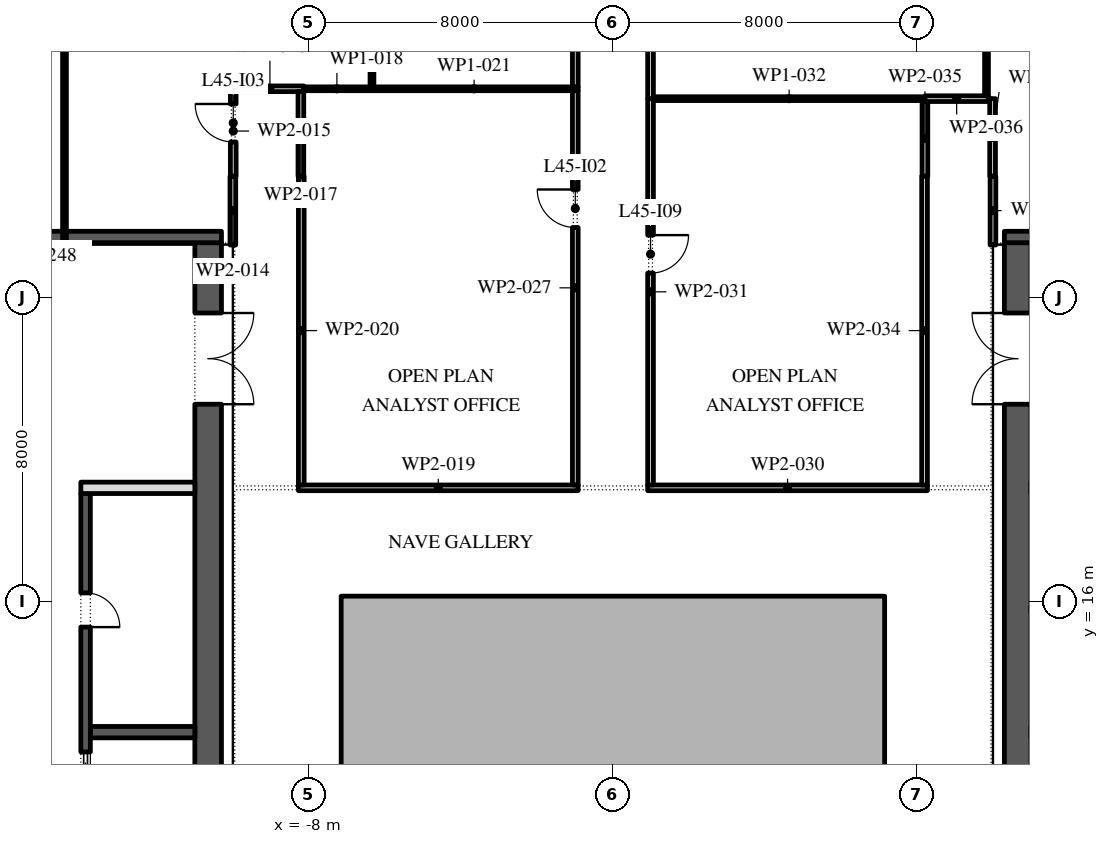
"""IFC4 building model, lengths in metres.
Left out: names, types, materials, properties, quantities, classifications, styles, units other than length and angle.
Written with IfcOpenShell. Run it as: python <this file> out.ifc"""

import sys

from ifc_helpers import new_model, si_unit, direction, frame, frame_2d, origin, place, context, subcontext, project, spatial, polyline, rectangle, outline, extrude, element, fill, save


model = new_model("IFC4")
c1 = context("Model", 3, precision=1e-05, world=origin(), true_north=direction((0.0, 1.0)))
c2 = subcontext(c1, "Body", "Model", "MODEL_VIEW")
j1 = project(units=[si_unit("LENGTHUNIT", "METRE"), si_unit("PLANEANGLEUNIT", "RADIAN")], contexts=[c1])
p1 = place(None, origin())
s1 = spatial("IfcSite", under=j1, at=p1, CompositionType="ELEMENT")
p2 = place(p1, origin())
s2 = spatial("IfcBuilding", under=s1, at=p2, CompositionType="ELEMENT")
p3 = place(p2, frame((0.0, 0.0, 205.2)))
s3 = spatial("IfcBuildingStorey", under=s2, at=p3, CompositionType="ELEMENT", Elevation=205.2)
p4 = place(p3, origin())
e1 = element("IfcWall", 1, at=p4, inside=s3, PredefinedType="STANDARD", context=c2, shape_type="SweptSolid", body=[
    extrude(outline(polyline([(-7.15, -2.15), (7.15, -2.15), (7.15, 16.15), (-7.15, 16.15), (-7.15, -2.15)]), holes=[polyline([(-7.0, -2.0), (-7.0, 16.0), (7.0, 16.0), (7.0, -2.0), (-7.0, -2.0)])]), origin(), (0.0, 0.0, 1.0), 4.0),
])
p5 = place(p3, frame((-10.65, -2.45, 0.0), z_axis=(0.0, 0.0, 1.0), x_axis=(0.0, 1.0, 0.0)))
e2 = element("IfcWall", 2, at=p5, inside=s3, PredefinedType="SHEAR", context=c2, shape_type="SweptSolid", body=[
    extrude(rectangle(XDim=27.9, YDim=0.7, at=frame_2d((13.95, 0.0))), origin(), (0.0, 0.0, 1.0), 4.0),
])
p6 = place(p5, frame((23.65, 0.0, 0.0)))
e3 = element("IfcOpeningElement", 3, at=p6, cuts=e2, PredefinedType="OPENING", context=c2, shape_type="SweptSolid", body=[
    extrude(rectangle(XDim=2.4, YDim=2.1, at=frame_2d((1.2, 1.05))), frame((0.0, 0.36, 0.0), z_axis=(0.0, -1.0, 0.0), x_axis=(1.0, 0.0, 0.0)), (0.0, 0.0, 1.0), 0.72),
])
p7 = place(p5, frame((1.087, 0.0, 0.0)))
e4 = element("IfcOpeningElement", 4, at=p7, cuts=e2, PredefinedType="OPENING", context=c2, shape_type="SweptSolid", body=[
    extrude(rectangle(XDim=0.9, YDim=2.1, at=frame_2d((0.45, 1.05))), frame((0.0, 0.36, 0.0), z_axis=(0.0, -1.0, 0.0), x_axis=(1.0, 0.0, 0.0)), (0.0, 0.0, 1.0), 0.72),
])
p8 = place(p5, frame((4.262, 0.0, 0.0)))
e5 = element("IfcOpeningElement", 5, at=p8, cuts=e2, PredefinedType="OPENING", context=c2, shape_type="SweptSolid", body=[
    extrude(rectangle(XDim=1.0, YDim=2.1, at=frame_2d((0.5, 1.05))), frame((0.0, 0.36, 0.0), z_axis=(0.0, -1.0, 0.0), x_axis=(1.0, 0.0, 0.0)), (0.0, 0.0, 1.0), 0.72),
])
p9 = place(p3, frame((-21.7, 25.6, 0.0), z_axis=(0.0, 0.0, 1.0), x_axis=(1.0, 0.0, 0.0)))
e6 = element("IfcWall", 6, at=p9, inside=s3, PredefinedType="SHEAR", context=c2, shape_type="SweptSolid", body=[
    extrude(rectangle(XDim=11.4, YDim=0.3, at=frame_2d((5.7, 0.0))), origin(), (0.0, 0.0, 1.0), 4.0),
])
p10 = place(p3, frame((-13.75, 12.571, 0.0), z_axis=(0.0, 0.0, 1.0), x_axis=(1.0, 0.0, 0.0)))
e7 = element("IfcWall", 7, at=p10, inside=s3, PredefinedType="SHEAR", context=c2, shape_type="SweptSolid", body=[
    extrude(rectangle(XDim=2.75, YDim=0.3, at=frame_2d((1.375, 0.0))), origin(), (0.0, 0.0, 1.0), 4.0),
])
p11 = place(p3, frame((-13.875, -2.45, 0.0), z_axis=(0.0, 0.0, 1.0), x_axis=(0.0, 1.0, 0.0)))
e8 = element("IfcWall", 8, at=p11, inside=s3, PredefinedType="SHEAR", context=c2, shape_type="SweptSolid", body=[
    extrude(rectangle(XDim=21.3, YDim=0.25, at=frame_2d((10.65, 0.0))), origin(), (0.0, 0.0, 1.0), 4.0),
])
p12 = place(p11, frame((17.786, 0.0, 0.0)))
e9 = element("IfcOpeningElement", 9, at=p12, cuts=e8, PredefinedType="OPENING", context=c2, shape_type="SweptSolid", body=[
    extrude(rectangle(XDim=0.9, YDim=2.1, at=frame_2d((0.45, 1.05))), frame((0.0, 0.135, 0.0), z_axis=(0.0, -1.0, 0.0), x_axis=(1.0, 0.0, 0.0)), (0.0, 0.0, 1.0), 0.27),
])
p13 = place(p11, frame((6.971, 0.0, 0.0)))
e10 = element("IfcOpeningElement", 10, at=p13, cuts=e8, PredefinedType="OPENING", context=c2, shape_type="SweptSolid", body=[
    extrude(rectangle(XDim=1.1, YDim=2.1, at=frame_2d((0.55, 1.05))), frame((0.0, 0.135, 0.0), z_axis=(0.0, -1.0, 0.0), x_axis=(1.0, 0.0, 0.0)), (0.0, 0.0, 1.0), 0.27),
])
p14 = place(p11, frame((9.114, 0.0, 0.0)))
e11 = element("IfcOpeningElement", 11, at=p14, cuts=e8, PredefinedType="OPENING", context=c2, shape_type="SweptSolid", body=[
    extrude(rectangle(XDim=1.1, YDim=2.1, at=frame_2d((0.55, 1.05))), frame((0.0, 0.135, 0.0), z_axis=(0.0, -1.0, 0.0), x_axis=(1.0, 0.0, 0.0)), (0.0, 0.0, 1.0), 0.27),
])
p15 = place(p11, frame((11.257, 0.0, 0.0)))
e12 = element("IfcOpeningElement", 12, at=p15, cuts=e8, PredefinedType="OPENING", context=c2, shape_type="SweptSolid", body=[
    extrude(rectangle(XDim=1.1, YDim=2.1, at=frame_2d((0.55, 1.05))), frame((0.0, 0.135, 0.0), z_axis=(0.0, -1.0, 0.0), x_axis=(1.0, 0.0, 0.0)), (0.0, 0.0, 1.0), 0.27),
])
p16 = place(p11, frame((13.4, 0.0, 0.0)))
e13 = element("IfcOpeningElement", 13, at=p16, cuts=e8, PredefinedType="OPENING", context=c2, shape_type="SweptSolid", body=[
    extrude(rectangle(XDim=1.1, YDim=2.1, at=frame_2d((0.55, 1.05))), frame((0.0, 0.135, 0.0), z_axis=(0.0, -1.0, 0.0), x_axis=(1.0, 0.0, 0.0)), (0.0, 0.0, 1.0), 0.27),
])
p17 = place(p3, frame((-14.0, 19.0, 0.0), z_axis=(0.0, 0.0, 1.0), x_axis=(1.0, 0.0, 0.0)))
e14 = element("IfcWall", 14, at=p17, inside=s3, PredefinedType="PARTITIONING", context=c2, shape_type="SweptSolid", body=[
    extrude(rectangle(XDim=3.0, YDim=0.3, at=frame_2d((1.5, 0.0))), origin(), (0.0, 0.0, 1.0), 4.0),
])
p18 = place(p3, frame((10.65, -2.45, 0.0), z_axis=(0.0, 0.0, 1.0), x_axis=(0.0, 1.0, 0.0)))
e15 = element("IfcWall", 15, at=p18, inside=s3, PredefinedType="SHEAR", context=c2, shape_type="SweptSolid", body=[
    extrude(rectangle(XDim=27.9, YDim=0.7, at=frame_2d((13.95, 0.0))), origin(), (0.0, 0.0, 1.0), 4.0),
])
p19 = place(p18, frame((23.65, 0.0, 0.0)))
e16 = element("IfcOpeningElement", 16, at=p19, cuts=e15, PredefinedType="OPENING", context=c2, shape_type="SweptSolid", body=[
    extrude(rectangle(XDim=2.4, YDim=2.1, at=frame_2d((1.2, 1.05))), frame((0.0, 0.36, 0.0), z_axis=(0.0, -1.0, 0.0), x_axis=(1.0, 0.0, 0.0)), (0.0, 0.0, 1.0), 0.72),
])
p20 = place(p18, frame((1.087, 0.0, 0.0)))
e17 = element("IfcOpeningElement", 17, at=p20, cuts=e15, PredefinedType="OPENING", context=c2, shape_type="SweptSolid", body=[
    extrude(rectangle(XDim=0.9, YDim=2.1, at=frame_2d((0.45, 1.05))), frame((0.0, 0.36, 0.0), z_axis=(0.0, -1.0, 0.0), x_axis=(1.0, 0.0, 0.0)), (0.0, 0.0, 1.0), 0.72),
])
p21 = place(p18, frame((4.262, 0.0, 0.0)))
e18 = element("IfcOpeningElement", 18, at=p21, cuts=e15, PredefinedType="OPENING", context=c2, shape_type="SweptSolid", body=[
    extrude(rectangle(XDim=1.0, YDim=2.1, at=frame_2d((0.5, 1.05))), frame((0.0, 0.36, 0.0), z_axis=(0.0, -1.0, 0.0), x_axis=(1.0, 0.0, 0.0)), (0.0, 0.0, 1.0), 0.72),
])
p22 = place(p3, frame((10.3, 25.6, 0.0), z_axis=(0.0, 0.0, 1.0), x_axis=(1.0, 0.0, 0.0)))
e19 = element("IfcWall", 19, at=p22, inside=s3, PredefinedType="SHEAR", context=c2, shape_type="SweptSolid", body=[
    extrude(rectangle(XDim=11.4, YDim=0.3, at=frame_2d((5.7, 0.0))), origin(), (0.0, 0.0, 1.0), 4.0),
])
p23 = place(p3, frame((-14.43, 38.193, 0.0), z_axis=(0.0, 0.0, 1.0), x_axis=(0.0, -1.0, 0.0)))
e20 = element("IfcWall", 20, at=p23, inside=s3, PredefinedType="PARTITIONING", context=c2, shape_type="SweptSolid", body=[
    extrude(rectangle(XDim=12.793, YDim=0.1, at=frame_2d((6.396, 0.0))), origin(), (0.0, 0.0, 1.0), 4.0),
])
p24 = place(p23, frame((4.473, 0.0, 0.0)))
e21 = element("IfcOpeningElement", 21, at=p24, cuts=e20, PredefinedType="OPENING", context=c2, shape_type="SweptSolid", body=[
    extrude(rectangle(XDim=0.9, YDim=2.1, at=frame_2d((0.45, 1.05))), frame((0.0, 0.06, 0.0), z_axis=(0.0, -1.0, 0.0), x_axis=(1.0, 0.0, 0.0)), (0.0, 0.0, 1.0), 0.12),
])
p25 = place(p3, frame((-10.0, 25.39, 0.0), z_axis=(0.0, 0.0, 1.0), x_axis=(0.0, 1.0, 0.0)))
e22 = element("IfcWall", 22, at=p25, inside=s3, PredefinedType="PARTITIONING", context=c2, shape_type="SweptSolid", body=[
    extrude(rectangle(XDim=1.81, YDim=0.15, at=frame_2d((0.905, 0.0))), origin(), (0.0, 0.0, 1.0), 4.0),
])
p26 = place(p3, frame((-9.99, 27.2, 0.0), z_axis=(0.0, 0.0, 1.0), x_axis=(0.0, 1.0, 0.0)))
e23 = element("IfcWall", 23, at=p26, inside=s3, PredefinedType="PARTITIONING", context=c2, shape_type="SweptSolid", body=[
    extrude(rectangle(XDim=2.375, YDim=0.15, at=frame_2d((1.188, 0.0))), origin(), (0.0, 0.0, 1.0), 4.0),
])
p27 = place(p26, frame((0.9, 0.0, 0.0)))
e24 = element("IfcOpeningElement", 24, at=p27, cuts=e23, PredefinedType="OPENING", context=c2, shape_type="SweptSolid", body=[
    extrude(rectangle(XDim=1.0, YDim=2.1, at=frame_2d((0.5, 1.05))), frame((0.0, 0.085, 0.0), z_axis=(0.0, -1.0, 0.0), x_axis=(1.0, 0.0, 0.0)), (0.0, 0.0, 1.0), 0.17),
])
p28 = place(p3, frame((-9.915, 29.5, 0.0), z_axis=(0.0, 0.0, 1.0), x_axis=(1.0, 0.0, 0.0)))
e25 = element("IfcWall", 25, at=p28, inside=s3, PredefinedType="PARTITIONING", context=c2, shape_type="SweptSolid", body=[
    extrude(rectangle(XDim=1.78, YDim=0.15, at=frame_2d((0.89, 0.0))), origin(), (0.0, 0.0, 1.0), 4.0),
])
p29 = place(p3, frame((-8.21, 29.425, 0.0), z_axis=(0.0, 0.0, 1.0), x_axis=(0.0, -1.0, 0.0)))
e26 = element("IfcWall", 26, at=p29, inside=s3, PredefinedType="PARTITIONING", context=c2, shape_type="SweptSolid", body=[
    extrude(rectangle(XDim=2.225, YDim=0.15, at=frame_2d((1.113, 0.0))), origin(), (0.0, 0.0, 1.0), 4.0),
])
p30 = place(p3, frame((-8.135, 29.5, 0.0), z_axis=(0.0, 0.0, 1.0), x_axis=(1.0, 0.0, 0.0)))
e27 = element("IfcWall", 27, at=p30, inside=s3, PredefinedType="PARTITIONING", context=c2, shape_type="SweptSolid", body=[
    extrude(rectangle(XDim=1.745, YDim=0.1, at=frame_2d((0.873, 0.0))), origin(), (0.0, 0.0, 1.0), 4.0),
])
p31 = place(p3, frame((-8.275, 19.0, 0.0), z_axis=(0.0, 0.0, 1.0), x_axis=(1.0, 0.0, 0.0)))
e28 = element("IfcWall", 28, at=p31, inside=s3, PredefinedType="PARTITIONING", context=c2, shape_type="SweptSolid", body=[
    extrude(rectangle(XDim=7.36, YDim=0.15, at=frame_2d((3.68, 0.0))), origin(), (0.0, 0.0, 1.0), 4.0),
])
p32 = place(p3, frame((-8.2, 27.2, 0.0), z_axis=(0.0, 0.0, 1.0), x_axis=(0.0, -1.0, 0.0)))
e29 = element("IfcWall", 29, at=p32, inside=s3, PredefinedType="PARTITIONING", context=c2, shape_type="SweptSolid", body=[
    extrude(rectangle(XDim=8.125, YDim=0.15, at=frame_2d((4.062, 0.0))), origin(), (0.0, 0.0, 1.0), 4.0),
])
p33 = place(p3, frame((-6.39, 29.5, 0.0), z_axis=(0.0, 0.0, 1.0), x_axis=(1.0, 0.0, 0.0)))
e30 = element("IfcWall", 30, at=p33, inside=s3, PredefinedType="PARTITIONING", context=c2, shape_type="SweptSolid", body=[
    extrude(rectangle(XDim=5.475, YDim=0.1, at=frame_2d((2.737, 0.0))), origin(), (0.0, 0.0, 1.0), 4.0),
])
p34 = place(p3, frame((-6.34, 40.061, 0.0), z_axis=(0.0, 0.0, 1.0), x_axis=(0.0, -1.0, 0.0)))
e31 = element("IfcWall", 31, at=p34, inside=s3, PredefinedType="PARTITIONING", context=c2, shape_type="SweptSolid", body=[
    extrude(rectangle(XDim=10.511, YDim=0.1, at=frame_2d((5.255, 0.0))), origin(), (0.0, 0.0, 1.0), 4.0),
])
p35 = place(p3, frame((-0.99, 19.075, 0.0), z_axis=(0.0, 0.0, 1.0), x_axis=(0.0, 1.0, 0.0)))
e32 = element("IfcWall", 32, at=p35, inside=s3, PredefinedType="PARTITIONING", context=c2, shape_type="SweptSolid", body=[
    extrude(rectangle(XDim=10.375, YDim=0.15, at=frame_2d((5.188, 0.0))), origin(), (0.0, 0.0, 1.0), 4.0),
])
p36 = place(p35, frame((6.775, 0.0, 0.0)))
e33 = element("IfcOpeningElement", 33, at=p36, cuts=e32, PredefinedType="OPENING", context=c2, shape_type="SweptSolid", body=[
    extrude(rectangle(XDim=1.0, YDim=2.1, at=frame_2d((0.5, 1.05))), frame((0.0, 0.085, 0.0), z_axis=(0.0, -1.0, 0.0), x_axis=(1.0, 0.0, 0.0)), (0.0, 0.0, 1.0), 0.17),
])
p37 = place(p3, frame((-0.99, 29.55, 0.0), z_axis=(0.0, 0.0, 1.0), x_axis=(0.0, 1.0, 0.0)))
e34 = element("IfcWall", 34, at=p37, inside=s3, PredefinedType="PARTITIONING", context=c2, shape_type="SweptSolid", body=[
    extrude(rectangle(XDim=11.746, YDim=0.15, at=frame_2d((5.873, 0.0))), origin(), (0.0, 0.0, 1.0), 4.0),
])
p38 = place(p37, frame((4.32, 0.0, 0.0)))
e35 = element("IfcOpeningElement", 35, at=p38, cuts=e34, PredefinedType="OPENING", context=c2, shape_type="SweptSolid", body=[
    extrude(rectangle(XDim=1.0, YDim=2.1, at=frame_2d((0.5, 1.05))), frame((0.0, 0.085, 0.0), z_axis=(0.0, -1.0, 0.0), x_axis=(1.0, 0.0, 0.0)), (0.0, 0.0, 1.0), 0.17),
])
p39 = place(p3, frame((0.915, 19.0, 0.0), z_axis=(0.0, 0.0, 1.0), x_axis=(1.0, 0.0, 0.0)))
e36 = element("IfcWall", 36, at=p39, inside=s3, PredefinedType="PARTITIONING", context=c2, shape_type="SweptSolid", body=[
    extrude(rectangle(XDim=7.36, YDim=0.15, at=frame_2d((3.68, 0.0))), origin(), (0.0, 0.0, 1.0), 4.0),
])
p40 = place(p3, frame((0.99, 29.24, 0.0), z_axis=(0.0, 0.0, 1.0), x_axis=(0.0, -1.0, 0.0)))
e37 = element("IfcWall", 37, at=p40, inside=s3, PredefinedType="PARTITIONING", context=c2, shape_type="SweptSolid", body=[
    extrude(rectangle(XDim=10.165, YDim=0.15, at=frame_2d((5.083, 0.0))), origin(), (0.0, 0.0, 1.0), 4.0),
])
p41 = place(p40, frame((3.59, 0.0, 0.0)))
e38 = element("IfcOpeningElement", 38, at=p41, cuts=e37, PredefinedType="OPENING", context=c2, shape_type="SweptSolid", body=[
    extrude(rectangle(XDim=1.0, YDim=2.1, at=frame_2d((0.5, 1.05))), frame((0.0, 0.085, 0.0), z_axis=(0.0, -1.0, 0.0), x_axis=(1.0, 0.0, 0.0)), (0.0, 0.0, 1.0), 0.17),
])
p42 = place(p3, frame((1.065, 29.24, 0.0), z_axis=(0.0, 0.0, 1.0), x_axis=(1.0, 0.0, 0.0)))
e39 = element("IfcWall", 39, at=p42, inside=s3, PredefinedType="PARTITIONING", context=c2, shape_type="SweptSolid", body=[
    extrude(rectangle(XDim=7.145, YDim=0.1, at=frame_2d((3.573, 0.0))), origin(), (0.0, 0.0, 1.0), 4.0),
])
p43 = place(p3, frame((0.99, 41.753, 0.0), z_axis=(0.0, 0.0, 1.0), x_axis=(0.0, -1.0, 0.0)))
e40 = element("IfcWall", 40, at=p43, inside=s3, PredefinedType="PARTITIONING", context=c2, shape_type="SweptSolid", body=[
    extrude(rectangle(XDim=12.513, YDim=0.15, at=frame_2d((6.256, 0.0))), origin(), (0.0, 0.0, 1.0), 4.0),
])
p44 = place(p43, frame((5.613, 0.0, 0.0)))
e41 = element("IfcOpeningElement", 41, at=p44, cuts=e40, PredefinedType="OPENING", context=c2, shape_type="SweptSolid", body=[
    extrude(rectangle(XDim=1.0, YDim=2.1, at=frame_2d((0.5, 1.05))), frame((0.0, 0.085, 0.0), z_axis=(0.0, -1.0, 0.0), x_axis=(1.0, 0.0, 0.0)), (0.0, 0.0, 1.0), 0.17),
])
p45 = place(p3, frame((8.2, 19.075, 0.0), z_axis=(0.0, 0.0, 1.0), x_axis=(0.0, 1.0, 0.0)))
e42 = element("IfcWall", 42, at=p45, inside=s3, PredefinedType="PARTITIONING", context=c2, shape_type="SweptSolid", body=[
    extrude(rectangle(XDim=8.125, YDim=0.15, at=frame_2d((4.062, 0.0))), origin(), (0.0, 0.0, 1.0), 4.0),
])
p46 = place(p3, frame((8.21, 27.2, 0.0), z_axis=(0.0, 0.0, 1.0), x_axis=(0.0, 1.0, 0.0)))
e43 = element("IfcWall", 43, at=p46, inside=s3, PredefinedType="PARTITIONING", context=c2, shape_type="SweptSolid", body=[
    extrude(rectangle(XDim=1.99, YDim=0.15, at=frame_2d((0.995, 0.0))), origin(), (0.0, 0.0, 1.0), 4.0),
])
p47 = place(p3, frame((8.21, 29.24, 0.0), z_axis=(0.0, 0.0, 1.0), x_axis=(1.0, 0.0, 0.0)))
e44 = element("IfcWall", 44, at=p47, inside=s3, PredefinedType="PARTITIONING", context=c2, shape_type="SweptSolid", body=[
    extrude(rectangle(XDim=1.67, YDim=0.15, at=frame_2d((0.835, 0.0))), origin(), (0.0, 0.0, 1.0), 4.0),
])
p48 = place(p3, frame((9.83, 43.794, 0.0), z_axis=(0.0, 0.0, 1.0), x_axis=(0.0, -1.0, 0.0)))
e45 = element("IfcWall", 45, at=p48, inside=s3, PredefinedType="PARTITIONING", context=c2, shape_type="SweptSolid", body=[
    extrude(rectangle(XDim=14.479, YDim=0.1, at=frame_2d((7.24, 0.0))), origin(), (0.0, 0.0, 1.0), 3.02),
])
p49 = place(p3, frame((9.99, 29.24, 0.0), z_axis=(0.0, 0.0, 1.0), x_axis=(0.0, -1.0, 0.0)))
e46 = element("IfcWall", 46, at=p49, inside=s3, PredefinedType="PARTITIONING", context=c2, shape_type="SweptSolid", body=[
    extrude(rectangle(XDim=2.04, YDim=0.15, at=frame_2d((1.02, 0.0))), origin(), (0.0, 0.0, 1.0), 3.02),
])
p50 = place(p3, frame((10.0, 27.2, 0.0), z_axis=(0.0, 0.0, 1.0), x_axis=(0.0, -1.0, 0.0)))
e47 = element("IfcWall", 47, at=p50, inside=s3, PredefinedType="PARTITIONING", context=c2, shape_type="SweptSolid", body=[
    extrude(rectangle(XDim=1.81, YDim=0.15, at=frame_2d((0.905, 0.0))), origin(), (0.0, 0.0, 1.0), 3.02),
])
p51 = place(p12, frame((0.9, -0.2, 0.0), z_axis=(0.0, 0.0, 1.0), x_axis=(-1.0, 0.0, 0.0)))
e48 = element("IfcDoor", 48, at=p51, inside=s3, OperationType="SINGLE_SWING_LEFT", PredefinedType="DOOR", context=c2, shape_type="SweptSolid", body=[
    extrude(rectangle(XDim=0.9, YDim=2.1, at=frame_2d((0.45, 1.05))), frame((0.0, -0.075, 0.0), z_axis=(0.0, -1.0, 0.0), x_axis=(1.0, 0.0, 0.0)), (0.0, 0.0, 1.0), 0.05),
])
fill(e9, e48)
p52 = place(p16, origin())
e49 = element("IfcDoor", 49, at=p52, inside=s3, OperationType="SLIDING_TO_LEFT", PredefinedType="DOOR", context=c2, shape_type="SweptSolid", body=[
    extrude(rectangle(XDim=1.1, YDim=2.1, at=frame_2d((0.55, 1.05))), frame((0.0, 0.025, 0.0), z_axis=(0.0, -1.0, 0.0), x_axis=(1.0, 0.0, 0.0)), (0.0, 0.0, 1.0), 0.05),
])
fill(e13, e49)
p53 = place(p6, frame((2.4, 0.0, 0.0), z_axis=(0.0, 0.0, 1.0), x_axis=(-1.0, 0.0, 0.0)))
e50 = element("IfcDoor", 50, at=p53, inside=s3, OperationType="DOUBLE_DOOR_SINGLE_SWING", PredefinedType="DOOR", context=c2, shape_type="SweptSolid", body=[
    extrude(rectangle(XDim=2.4, YDim=2.1, at=frame_2d((1.2, 1.05))), frame((0.0, 0.025, 0.0), z_axis=(0.0, -1.0, 0.0), x_axis=(1.0, 0.0, 0.0)), (0.0, 0.0, 1.0), 0.05),
])
fill(e3, e50)
p54 = place(p19, origin())
e51 = element("IfcDoor", 51, at=p54, inside=s3, OperationType="DOUBLE_DOOR_SINGLE_SWING", PredefinedType="DOOR", context=c2, shape_type="SweptSolid", body=[
    extrude(rectangle(XDim=2.4, YDim=2.1, at=frame_2d((1.2, 1.05))), frame((0.0, 0.025, 0.0), z_axis=(0.0, -1.0, 0.0), x_axis=(1.0, 0.0, 0.0)), (0.0, 0.0, 1.0), 0.05),
])
fill(e16, e51)
p55 = place(p36, origin())
e52 = element("IfcDoor", 52, at=p55, inside=s3, OperationType="SINGLE_SWING_LEFT", PredefinedType="DOOR", context=c2, shape_type="SweptSolid", body=[
    extrude(rectangle(XDim=1.0, YDim=2.1, at=frame_2d((0.5, 1.05))), frame((0.0, 0.025, 0.0), z_axis=(0.0, -1.0, 0.0), x_axis=(1.0, 0.0, 0.0)), (0.0, 0.0, 1.0), 0.05),
])
fill(e33, e52)
p56 = place(p27, origin())
e53 = element("IfcDoor", 53, at=p56, inside=s3, OperationType="SINGLE_SWING_LEFT", PredefinedType="DOOR", context=c2, shape_type="SweptSolid", body=[
    extrude(rectangle(XDim=1.0, YDim=2.1, at=frame_2d((0.5, 1.05))), frame((0.0, 0.025, 0.0), z_axis=(0.0, -1.0, 0.0), x_axis=(1.0, 0.0, 0.0)), (0.0, 0.0, 1.0), 0.05),
])
fill(e24, e53)
p57 = place(p41, origin())
e54 = element("IfcDoor", 54, at=p57, inside=s3, OperationType="SINGLE_SWING_RIGHT", PredefinedType="DOOR", context=c2, shape_type="SweptSolid", body=[
    extrude(rectangle(XDim=1.0, YDim=2.1, at=frame_2d((0.5, 1.05))), frame((0.0, 0.025, 0.0), z_axis=(0.0, -1.0, 0.0), x_axis=(1.0, 0.0, 0.0)), (0.0, 0.0, 1.0), 0.05),
])
fill(e38, e54)
save(model, sys.argv[1])
